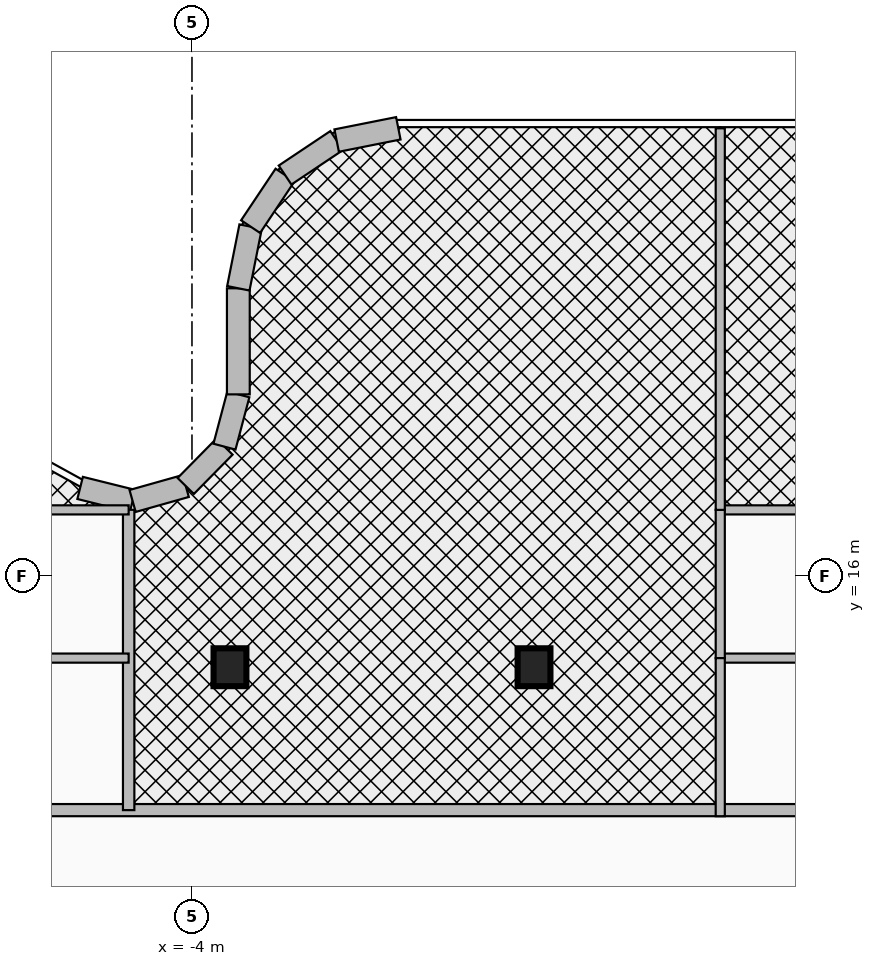
"""IFC4 building model, lengths in metres.
Left out: names, types, materials, properties, quantities, classifications, styles, units other than length and angle.
Written with IfcOpenShell. Run it as: python <this file> out.ifc"""

import sys

from ifc_helpers import new_model, si_unit, direction, frame, frame_2d, origin, origin_2d, place, context, subcontext, project, spatial, rectangle, i_section, extrude, source, transform, mapped, element, fill, save


model = new_model("IFC4")
c1 = context("Model", 3, precision=1e-05, world=origin(), true_north=direction((0.0, 1.0)))
c2 = subcontext(c1, "Body", "Model", "MODEL_VIEW")
j1 = project(units=[si_unit("LENGTHUNIT", "METRE"), si_unit("PLANEANGLEUNIT", "RADIAN")], contexts=[c1])
p1 = place(None, origin())
s1 = spatial("IfcSite", under=j1, at=p1, CompositionType="ELEMENT")
p2 = place(p1, origin())
s2 = spatial("IfcBuilding", under=s1, at=p2, CompositionType="ELEMENT")
p3 = place(p2, frame((0.0, 0.0, 180.5)))
s3 = spatial("IfcBuildingStorey", under=s2, at=p3, CompositionType="ELEMENT", Elevation=180.5)
m1 = source(origin(), c2, "Body", "SweptSolid", [
    extrude(i_section(OverallWidth=0.432, OverallDepth=0.498, WebThickness=0.056, FlangeThickness=0.089, at=origin_2d()), origin(), (0.0, 0.0, 1.0), 3.95),
])
for number, where, z_axis, x_axis in (
    (1, (-3.5, 14.8, 0.0), (0.0, 0.0, 1.0), (1.0, 0.0, 0.0)),
    (2, (0.5, 14.8, 0.0), (0.0, 0.0, 1.0), (1.0, 0.0, 0.0)),
):
    element("IfcColumn", number, at=place(p3, frame(where, z_axis=z_axis, x_axis=x_axis)), inside=s3, PredefinedType="COLUMN", context=c2, shape_type="MappedRepresentation", body=[
        mapped(m1, transform((0.0, 0.0, 0.0), x_axis=(1.0, 0.0, 0.0), y_axis=(0.0, 1.0, 0.0), z_axis=(0.0, 0.0, 1.0), scale=1.0)),
    ])
p4 = place(p3, frame((-5.472, 17.159, 0.0), z_axis=(0.0, 0.0, 1.0), x_axis=(0.970564820059, -0.240840050789, 0.0)))
e3 = element("IfcWall", 3, at=p4, inside=s3, PredefinedType="SOLIDWALL", context=c2, shape_type="SweptSolid", body=[
    extrude(rectangle(XDim=0.712, YDim=0.3, at=frame_2d((0.356, 0.0))), origin(), (0.0, 0.0, 1.0), 3.63),
])
p5 = place(p3, frame((-4.781, 16.987, 0.0), z_axis=(0.0, 0.0, 1.0), x_axis=(0.962494705656, 0.271300463662, 0.0)))
e4 = element("IfcWall", 4, at=p5, inside=s3, PredefinedType="SOLIDWALL", context=c2, shape_type="SweptSolid", body=[
    extrude(rectangle(XDim=0.726, YDim=0.3, at=frame_2d((0.363, 0.0))), origin(), (0.0, 0.0, 1.0), 3.63),
])
p6 = place(p3, frame((-4.082, 17.184, 0.0), z_axis=(0.0, 0.0, 1.0), x_axis=(0.701538604215, 0.712631452293, 0.0)))
e5 = element("IfcWall", 5, at=p6, inside=s3, PredefinedType="SOLIDWALL", context=c2, shape_type="SweptSolid", body=[
    extrude(rectangle(XDim=0.726, YDim=0.3, at=frame_2d((0.363, 0.0))), origin(), (0.0, 0.0, 1.0), 2.615),
])
p7 = place(p3, frame((-3.573, 17.702, 0.0), z_axis=(0.0, 0.0, 1.0), x_axis=(0.256637481794, 0.966507735581, 0.0)))
e6 = element("IfcWall", 6, at=p7, inside=s3, PredefinedType="SOLIDWALL", context=c2, shape_type="SweptSolid", body=[
    extrude(rectangle(XDim=0.712, YDim=0.3, at=frame_2d((0.356, 0.0))), origin(), (0.0, 0.0, 1.0), 2.615),
])
p8 = place(p3, frame((-3.39, 18.39, 0.0), z_axis=(0.0, 0.0, 1.0), x_axis=(0.0, 1.0, 0.0)))
e7 = element("IfcWall", 7, at=p8, inside=s3, PredefinedType="SOLIDWALL", context=c2, shape_type="SweptSolid", body=[
    extrude(rectangle(XDim=1.396, YDim=0.3, at=frame_2d((0.698, 0.0))), origin(), (0.0, 0.0, 1.0), 2.615),
])
p9 = place(p3, frame((-3.39, 19.785, 0.0), z_axis=(0.0, 0.0, 1.0), x_axis=(0.195094354541, 0.980784478276, 0.0)))
e8 = element("IfcWall", 8, at=p9, inside=s3, PredefinedType="SOLIDWALL", context=c2, shape_type="SweptSolid", body=[
    extrude(rectangle(XDim=0.827, YDim=0.3, at=frame_2d((0.414, 0.0))), origin(), (0.0, 0.0, 1.0), 2.615),
])
p10 = place(p3, frame((-3.229, 20.596, 0.0), z_axis=(0.0, 0.0, 1.0), x_axis=(0.55545926088, 0.831543750805, 0.0)))
e9 = element("IfcWall", 9, at=p10, inside=s3, PredefinedType="SOLIDWALL", context=c2, shape_type="SweptSolid", body=[
    extrude(rectangle(XDim=0.816, YDim=0.3, at=frame_2d((0.408, 0.0))), origin(), (0.0, 0.0, 1.0), 2.615),
])
p11 = place(p3, frame((-2.775, 21.275, 0.0), z_axis=(0.0, 0.0, 1.0), x_axis=(0.831543750805, 0.55545926088, 0.0)))
e10 = element("IfcWall", 10, at=p11, inside=s3, PredefinedType="SOLIDWALL", context=c2, shape_type="SweptSolid", body=[
    extrude(rectangle(XDim=0.816, YDim=0.3, at=frame_2d((0.408, 0.0))), origin(), (0.0, 0.0, 1.0), 3.63),
])
p12 = place(p3, frame((-2.096, 21.729, 0.0), z_axis=(0.0, 0.0, 1.0), x_axis=(0.980784478276, 0.195094354541, 0.0)))
e11 = element("IfcWall", 11, at=p12, inside=s3, PredefinedType="SOLIDWALL", context=c2, shape_type="SweptSolid", body=[
    extrude(rectangle(XDim=0.827, YDim=0.3, at=frame_2d((0.414, 0.0))), origin(), (0.0, 0.0, 1.0), 3.076),
])
p13 = place(p3, frame((-28.25, 12.92, 0.0), z_axis=(0.0, 0.0, 1.0), x_axis=(1.0, 0.0, 0.0)))
e12 = element("IfcWall", 12, at=p13, inside=s3, PredefinedType="PARTITIONING", context=c2, shape_type="SweptSolid", body=[
    extrude(rectangle(XDim=36.75, YDim=0.16, at=frame_2d((18.375, 0.0))), origin(), (0.0, 0.0, 1.0), 2.615),
])
p14 = place(p13, frame((1.386, 0.0, 0.0)))
e13 = element("IfcOpeningElement", 13, at=p14, cuts=e12, PredefinedType="OPENING", context=c2, shape_type="SweptSolid", body=[
    extrude(rectangle(XDim=0.95, YDim=2.15, at=frame_2d((0.475, 1.075))), frame((0.0, 0.095, 0.0), z_axis=(0.0, -1.0, 0.0), x_axis=(1.0, 0.0, 0.0)), (0.0, 0.0, 1.0), 0.19),
])
p15 = place(p13, frame((5.327, 0.0, 0.0)))
e14 = element("IfcOpeningElement", 14, at=p15, cuts=e12, PredefinedType="OPENING", context=c2, shape_type="SweptSolid", body=[
    extrude(rectangle(XDim=0.95, YDim=2.15, at=frame_2d((0.475, 1.075))), frame((0.0, 0.095, 0.0), z_axis=(0.0, -1.0, 0.0), x_axis=(1.0, 0.0, 0.0)), (0.0, 0.0, 1.0), 0.19),
])
p16 = place(p13, frame((13.5, 0.0, 0.0)))
e15 = element("IfcOpeningElement", 15, at=p16, cuts=e12, PredefinedType="OPENING", context=c2, shape_type="SweptSolid", body=[
    extrude(rectangle(XDim=0.95, YDim=2.15, at=frame_2d((0.475, 1.075))), frame((0.0, 0.095, 0.0), z_axis=(0.0, -1.0, 0.0), x_axis=(1.0, 0.0, 0.0)), (0.0, 0.0, 1.0), 0.19),
])
p17 = place(p13, frame((26.834, 0.0, 0.0)))
e16 = element("IfcOpeningElement", 16, at=p17, cuts=e12, PredefinedType="OPENING", context=c2, shape_type="SweptSolid", body=[
    extrude(rectangle(XDim=0.95, YDim=2.15, at=frame_2d((0.475, 1.075))), frame((0.0, 0.095, 0.0), z_axis=(0.0, -1.0, 0.0), x_axis=(1.0, 0.0, 0.0)), (0.0, 0.0, 1.0), 0.19),
])
p18 = place(p3, frame((-4.833, 12.92, 0.0), z_axis=(0.0, 0.0, 1.0), x_axis=(0.0, 1.0, 0.0)))
e17 = element("IfcWall", 17, at=p18, inside=s3, PredefinedType="PARTITIONING", context=c2, shape_type="SweptSolid", body=[
    extrude(rectangle(XDim=3.951, YDim=0.15, at=frame_2d((1.976, 0.0))), origin(), (0.0, 0.0, 1.0), 2.415),
])
p19 = place(p3, frame((-10.383, 14.92, 0.0), z_axis=(0.0, 0.0, 1.0), x_axis=(1.0, 0.0, 0.0)))
e18 = element("IfcWall", 18, at=p19, inside=s3, PredefinedType="PARTITIONING", context=c2, shape_type="SweptSolid", body=[
    extrude(rectangle(XDim=5.55, YDim=0.12, at=frame_2d((2.775, 0.0))), origin(), (0.0, 0.0, 1.0), 2.415),
])
p20 = place(p3, frame((-10.383, 16.87, 0.0), z_axis=(0.0, 0.0, 1.0), x_axis=(1.0, 0.0, 0.0)))
e19 = element("IfcWall", 19, at=p20, inside=s3, PredefinedType="PARTITIONING", context=c2, shape_type="SweptSolid", body=[
    extrude(rectangle(XDim=5.55, YDim=0.12, at=frame_2d((2.775, 0.0))), origin(), (0.0, 0.0, 1.0), 3.63),
])
for number, where, z_axis, x_axis in (
    (20, (2.95, 14.92, 0.0), (0.0, 0.0, 1.0), (1.0, 0.0, 0.0)),
    (21, (2.95, 16.87, 0.0), (0.0, 0.0, 1.0), (1.0, 0.0, 0.0)),
):
    element("IfcWall", number, at=place(p3, frame(where, z_axis=z_axis, x_axis=x_axis)), inside=s3, PredefinedType="PARTITIONING", context=c2, shape_type="SweptSolid", body=[
        extrude(rectangle(XDim=5.55, YDim=0.12, at=frame_2d((2.775, 0.0))), origin(), (0.0, 0.0, 1.0), 2.615),
    ])
p21 = place(p3, frame((2.95, 14.92, 0.0), z_axis=(0.0, 0.0, 1.0), x_axis=(0.0, 1.0, 0.0)))
e22 = element("IfcWall", 22, at=p21, inside=s3, PredefinedType="PARTITIONING", context=c2, shape_type="SweptSolid", body=[
    extrude(rectangle(XDim=1.95, YDim=0.12, at=frame_2d((0.975, 0.0))), origin(), (0.0, 0.0, 1.0), 2.665),
])
p22 = place(p21, frame((0.55, 0.0, 0.0)))
e23 = element("IfcOpeningElement", 23, at=p22, cuts=e22, PredefinedType="OPENING", context=c2, shape_type="SweptSolid", body=[
    extrude(rectangle(XDim=0.85, YDim=2.1, at=frame_2d((0.425, 1.05))), frame((0.0, 0.075, 0.0), z_axis=(0.0, -1.0, 0.0), x_axis=(1.0, 0.0, 0.0)), (0.0, 0.0, 1.0), 0.15),
])
p23 = place(p3, frame((2.95, 12.84, 0.0), z_axis=(0.0, 0.0, 1.0), x_axis=(0.0, 1.0, 0.0)))
e24 = element("IfcWall", 24, at=p23, inside=s3, PredefinedType="PARTITIONING", context=c2, shape_type="SweptSolid", body=[
    extrude(rectangle(XDim=2.08, YDim=0.12, at=frame_2d((1.04, 0.0))), origin(), (0.0, 0.0, 1.0), 2.665),
])
p24 = place(p23, frame((0.55, 0.0, 0.0)))
e25 = element("IfcOpeningElement", 25, at=p24, cuts=e24, PredefinedType="OPENING", context=c2, shape_type="SweptSolid", body=[
    extrude(rectangle(XDim=0.9, YDim=2.1, at=frame_2d((0.45, 1.05))), frame((0.0, 0.075, 0.0), z_axis=(0.0, -1.0, 0.0), x_axis=(1.0, 0.0, 0.0)), (0.0, 0.0, 1.0), 0.15),
])
p25 = place(p3, frame((2.95, 16.87, 0.0), z_axis=(0.0, 0.0, 1.0), x_axis=(0.0, 1.0, 0.0)))
e26 = element("IfcWall", 26, at=p25, inside=s3, PredefinedType="PARTITIONING", context=c2, shape_type="SweptSolid", body=[
    extrude(rectangle(XDim=5.02, YDim=0.12, at=frame_2d((2.51, 0.0))), origin(), (0.0, 0.0, 1.0), 3.076),
])
p26 = place(p25, frame((2.06, 0.0, 0.0)))
e27 = element("IfcOpeningElement", 27, at=p26, cuts=e26, PredefinedType="OPENING", context=c2, shape_type="SweptSolid", body=[
    extrude(rectangle(XDim=0.9, YDim=2.1, at=frame_2d((0.45, 1.05))), frame((0.0, 0.075, 0.0), z_axis=(0.0, -1.0, 0.0), x_axis=(1.0, 0.0, 0.0)), (0.0, 0.0, 1.0), 0.15),
])
p27 = place(p17, frame((0.95, 0.0, 0.0), z_axis=(0.0, 0.0, 1.0), x_axis=(-1.0, 0.0, 0.0)))
e28 = element("IfcDoor", 28, at=p27, inside=s3, OperationType="SINGLE_SWING_LEFT", PredefinedType="DOOR", context=c2, shape_type="SweptSolid", body=[
    extrude(rectangle(XDim=0.95, YDim=2.15, at=frame_2d((0.475, 1.075))), frame((0.0, 0.025, 0.0), z_axis=(0.0, -1.0, 0.0), x_axis=(1.0, 0.0, 0.0)), (0.0, 0.0, 1.0), 0.05),
])
fill(e16, e28)
p28 = place(p22, origin())
e29 = element("IfcDoor", 29, at=p28, inside=s3, OperationType="SINGLE_SWING_RIGHT", PredefinedType="DOOR", context=c2, shape_type="SweptSolid", body=[
    extrude(rectangle(XDim=0.85, YDim=2.1, at=frame_2d((0.425, 1.05))), frame((0.0, 0.025, 0.0), z_axis=(0.0, -1.0, 0.0), x_axis=(1.0, 0.0, 0.0)), (0.0, 0.0, 1.0), 0.05),
])
fill(e23, e29)
p29 = place(p24, origin())
e30 = element("IfcDoor", 30, at=p29, inside=s3, OperationType="SINGLE_SWING_LEFT", PredefinedType="DOOR", context=c2, shape_type="SweptSolid", body=[
    extrude(rectangle(XDim=0.9, YDim=2.1, at=frame_2d((0.45, 1.05))), frame((0.0, 0.025, 0.0), z_axis=(0.0, -1.0, 0.0), x_axis=(1.0, 0.0, 0.0)), (0.0, 0.0, 1.0), 0.05),
])
fill(e25, e30)
p30 = place(p26, origin())
e31 = element("IfcDoor", 31, at=p30, inside=s3, OperationType="SINGLE_SWING_RIGHT", PredefinedType="DOOR", context=c2, shape_type="SweptSolid", body=[
    extrude(rectangle(XDim=0.9, YDim=2.1, at=frame_2d((0.45, 1.05))), frame((0.0, 0.025, 0.0), z_axis=(0.0, -1.0, 0.0), x_axis=(1.0, 0.0, 0.0)), (0.0, 0.0, 1.0), 0.05),
])
fill(e27, e31)
save(model, sys.argv[1])
